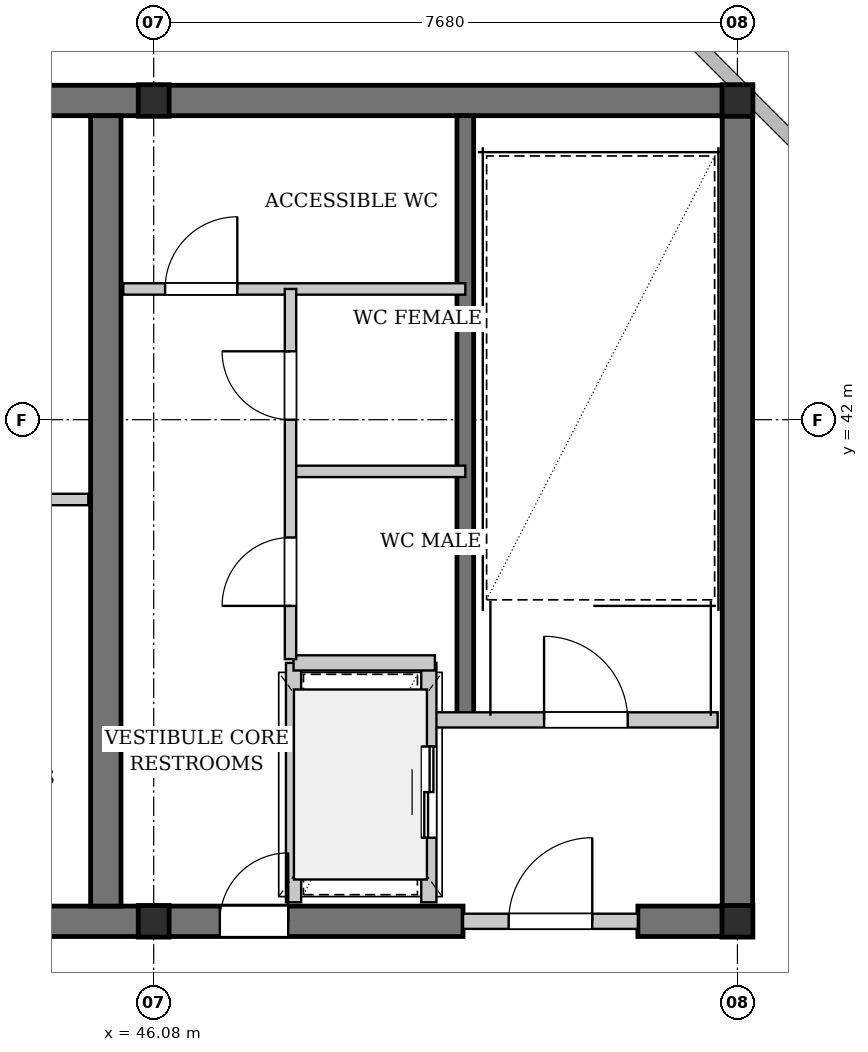
"""IFC4 building model, lengths in metres.
Left out: names, types, materials, properties, quantities, classifications, styles, units other than length and angle.
Written with IfcOpenShell. Run it as: python <this file> out.ifc"""

import sys

from ifc_helpers import new_model, si_unit, direction, frame, frame_2d, origin, origin_2d, place, context, subcontext, project, spatial, rectangle, i_section, extrude, element, fill, save


model = new_model("IFC4")
c1 = context("Model", 3, precision=1e-05, world=origin(), true_north=direction((0.0, 1.0)))
c2 = subcontext(c1, "Body", "Model", "MODEL_VIEW")
j1 = project(units=[si_unit("LENGTHUNIT", "METRE"), si_unit("PLANEANGLEUNIT", "RADIAN")], contexts=[c1])
p1 = place(None, origin())
s1 = spatial("IfcSite", under=j1, at=p1, CompositionType="ELEMENT")
p2 = place(p1, origin())
s2 = spatial("IfcBuilding", under=s1, at=p2, CompositionType="ELEMENT")
p3 = place(p2, frame((0.0, 0.0, 304.4)))
s3 = spatial("IfcBuildingStorey", under=s2, at=p3, CompositionType="ELEMENT", Elevation=304.4)
p4 = place(p3, frame((22.84, 46.2, 0.0), z_axis=(0.0, 0.0, 1.0), x_axis=(1.0, 0.0, 0.0)))
e1 = element("IfcWall", 1, at=p4, inside=s3, PredefinedType="SHEAR", context=c2, shape_type="SweptSolid", body=[
    extrude(rectangle(XDim=31.12, YDim=0.4, at=frame_2d((15.56, 0.0))), origin(), (0.0, 0.0, 1.0), 5.28),
])
p5 = place(p3, frame((42.1, 35.4, 0.0), z_axis=(0.0, 0.0, 1.0), x_axis=(1.0, 0.0, 0.0)))
e2 = element("IfcWall", 2, at=p5, inside=s3, PredefinedType="SHEAR", context=c2, shape_type="SweptSolid", body=[
    extrude(rectangle(XDim=8.05, YDim=0.4, at=frame_2d((4.025, 0.0))), origin(), (0.0, 0.0, 1.0), 5.28),
])
p6 = place(p5, frame((4.85, 0.0, 0.0)))
e3 = element("IfcOpeningElement", 3, at=p6, cuts=e2, PredefinedType="OPENING", context=c2, shape_type="SweptSolid", body=[
    extrude(rectangle(XDim=0.9, YDim=2.15, at=frame_2d((0.45, 1.075))), frame((0.0, 0.21, 0.0), z_axis=(0.0, -1.0, 0.0), x_axis=(1.0, 0.0, 0.0)), (0.0, 0.0, 1.0), 0.42),
])
p7 = place(p3, frame((52.45, 35.4, 0.0), z_axis=(0.0, 0.0, 1.0), x_axis=(1.0, 0.0, 0.0)))
e4 = element("IfcWall", 4, at=p7, inside=s3, PredefinedType="SHEAR", context=c2, shape_type="SweptSolid", body=[
    extrude(rectangle(XDim=1.51, YDim=0.4, at=frame_2d((0.755, 0.0))), origin(), (0.0, 0.0, 1.0), 5.28),
])
for number, where, z_axis, x_axis in (
    (5, (45.45, 35.6, 0.0), (0.0, 0.0, 1.0), (0.0, 1.0, 0.0)),
    (6, (53.76, 35.6, 0.0), (0.0, 0.0, 1.0), (0.0, 1.0, 0.0)),
):
    element("IfcWall", number, at=place(p3, frame(where, z_axis=z_axis, x_axis=x_axis)), inside=s3, PredefinedType="SHEAR", context=c2, shape_type="SweptSolid", body=[
        extrude(rectangle(XDim=10.4, YDim=0.4, at=frame_2d((5.2, 0.0))), origin(), (0.0, 0.0, 1.0), 5.28),
    ])
p8 = place(p3, frame((50.18, 38.05, 0.0), z_axis=(0.0, 0.0, 1.0), x_axis=(0.0, 1.0, 0.0)))
e7 = element("IfcWall", 7, at=p8, inside=s3, PredefinedType="SHEAR", context=c2, shape_type="SweptSolid", body=[
    extrude(rectangle(XDim=7.95, YDim=0.22, at=frame_2d((3.975, 0.0))), origin(), (0.0, 0.0, 1.0), 5.28),
])
for number, where, z_axis, x_axis in (
    (8, (46.08, 35.4, 0.0), (0.0, 0.0, 1.0), (1.0, 0.0, 0.0)),
    (9, (46.08, 46.2, 0.0), (0.0, 0.0, 1.0), (1.0, 0.0, 0.0)),
    (10, (53.76, 35.4, 0.0), (0.0, 0.0, 1.0), (1.0, 0.0, 0.0)),
    (11, (53.76, 46.2, 0.0), (0.0, 0.0, 1.0), (1.0, 0.0, 0.0)),
):
    element("IfcColumn", number, at=place(p3, frame(where, z_axis=z_axis, x_axis=x_axis)), inside=s3, PredefinedType="COLUMN", context=c2, shape_type="SweptSolid", body=[
        extrude(i_section(OverallWidth=0.406, OverallDepth=0.416, WebThickness=0.03, FlangeThickness=0.048, FilletRadius=0.015, at=origin_2d()), origin(), (0.0, 0.0, 1.0), 5.6),
    ])
p9 = place(p3, frame((41.85, 40.95, 0.0), z_axis=(0.0, 0.0, 1.0), x_axis=(1.0, 0.0, 0.0)))
e12 = element("IfcWall", 12, at=p9, inside=s3, PredefinedType="PARTITIONING", context=c2, shape_type="SweptSolid", body=[
    extrude(rectangle(XDim=3.37, YDim=0.15, at=frame_2d((1.685, 0.0))), origin(), (0.0, 0.0, 1.0), 5.28),
])
p10 = place(p3, frame((49.78, 38.05, 0.0), z_axis=(0.0, 0.0, 1.0), x_axis=(1.0, 0.0, 0.0)))
e13 = element("IfcWall", 13, at=p10, inside=s3, PredefinedType="PARTITIONING", context=c2, shape_type="SweptSolid", body=[
    extrude(rectangle(XDim=3.72, YDim=0.2, at=frame_2d((1.86, 0.0))), origin(), (0.0, 0.0, 1.0), 5.28),
])
p11 = place(p10, frame((1.436, 0.0, 0.0)))
e14 = element("IfcOpeningElement", 14, at=p11, cuts=e13, PredefinedType="OPENING", context=c2, shape_type="SweptSolid", body=[
    extrude(rectangle(XDim=1.1, YDim=2.15, at=frame_2d((0.55, 1.075))), frame((0.0, 0.11, 0.0), z_axis=(0.0, -1.0, 0.0), x_axis=(1.0, 0.0, 0.0)), (0.0, 0.0, 1.0), 0.22),
])
p12 = place(p3, frame((50.15, 35.4, 0.0), z_axis=(0.0, 0.0, 1.0), x_axis=(1.0, 0.0, 0.0)))
e15 = element("IfcWall", 15, at=p12, inside=s3, PredefinedType="PARTITIONING", context=c2, shape_type="SweptSolid", body=[
    extrude(rectangle(XDim=2.3, YDim=0.2, at=frame_2d((1.15, 0.0))), origin(), (0.0, 0.0, 1.0), 4.725),
])
p13 = place(p12, frame((0.6, 0.0, 0.0)))
e16 = element("IfcOpeningElement", 16, at=p13, cuts=e15, PredefinedType="OPENING", context=c2, shape_type="SweptSolid", body=[
    extrude(rectangle(XDim=1.1, YDim=2.15, at=frame_2d((0.55, 1.075))), frame((0.0, 0.11, 0.0), z_axis=(0.0, -1.0, 0.0), x_axis=(1.0, 0.0, 0.0)), (0.0, 0.0, 1.0), 0.22),
])
p14 = place(p3, frame((49.7, 35.65, 0.0), z_axis=(0.0, 0.0, 1.0), x_axis=(0.0, 1.0, 0.0)))
e17 = element("IfcWall", 17, at=p14, inside=s3, PredefinedType="PARTITIONING", context=c2, shape_type="SweptSolid", body=[
    extrude(rectangle(XDim=3.15, YDim=0.2, at=frame_2d((1.575, 0.0))), origin(), (0.0, 0.0, 1.0), 5.28),
])
p15 = place(p14, frame((0.85, 0.0, 0.0)))
e18 = element("IfcOpeningElement", 18, at=p15, cuts=e17, PredefinedType="OPENING", context=c2, shape_type="SweptSolid", body=[
    extrude(rectangle(XDim=1.2, YDim=2.2, at=frame_2d((0.6, 1.1))), frame((0.0, 0.11, 0.0), z_axis=(0.0, -1.0, 0.0), x_axis=(1.0, 0.0, 0.0)), (0.0, 0.0, 1.0), 0.22),
])
p16 = place(p3, frame((47.92, 35.65, 0.0), z_axis=(0.0, 0.0, 1.0), x_axis=(0.0, 1.0, 0.0)))
e19 = element("IfcWall", 19, at=p16, inside=s3, PredefinedType="PARTITIONING", context=c2, shape_type="SweptSolid", body=[
    extrude(rectangle(XDim=3.15, YDim=0.2, at=frame_2d((1.575, 0.0))), origin(), (0.0, 0.0, 1.0), 5.28),
])
p17 = place(p3, frame((47.92, 38.8, 0.0), z_axis=(0.0, 0.0, 1.0), x_axis=(1.0, 0.0, 0.0)))
e20 = element("IfcWall", 20, at=p17, inside=s3, PredefinedType="PARTITIONING", context=c2, shape_type="SweptSolid", body=[
    extrude(rectangle(XDim=1.86, YDim=0.2, at=frame_2d((0.93, 0.0))), origin(), (0.0, 0.0, 1.0), 5.28),
])
p18 = place(p3, frame((45.68, 43.72, 0.0), z_axis=(0.0, 0.0, 1.0), x_axis=(1.0, 0.0, 0.0)))
e21 = element("IfcWall", 21, at=p18, inside=s3, PredefinedType="PARTITIONING", context=c2, shape_type="SweptSolid", body=[
    extrude(rectangle(XDim=4.5, YDim=0.15, at=frame_2d((2.25, 0.0))), origin(), (0.0, 0.0, 1.0), 5.28),
])
p19 = place(p18, frame((0.55, 0.0, 0.0)))
e22 = element("IfcOpeningElement", 22, at=p19, cuts=e21, PredefinedType="OPENING", context=c2, shape_type="SweptSolid", body=[
    extrude(rectangle(XDim=0.95, YDim=2.15, at=frame_2d((0.475, 1.075))), frame((0.0, 0.085, 0.0), z_axis=(0.0, -1.0, 0.0), x_axis=(1.0, 0.0, 0.0)), (0.0, 0.0, 1.0), 0.17),
])
p20 = place(p3, frame((47.88, 41.32, 0.0), z_axis=(0.0, 0.0, 1.0), x_axis=(1.0, 0.0, 0.0)))
e23 = element("IfcWall", 23, at=p20, inside=s3, PredefinedType="PARTITIONING", context=c2, shape_type="SweptSolid", body=[
    extrude(rectangle(XDim=2.3, YDim=0.15, at=frame_2d((1.15, 0.0))), origin(), (0.0, 0.0, 1.0), 5.28),
])
p21 = place(p3, frame((47.88, 38.85, 0.0), z_axis=(0.0, 0.0, 1.0), x_axis=(0.0, 1.0, 0.0)))
e24 = element("IfcWall", 24, at=p21, inside=s3, PredefinedType="PARTITIONING", context=c2, shape_type="SweptSolid", body=[
    extrude(rectangle(XDim=4.87, YDim=0.15, at=frame_2d((2.435, 0.0))), origin(), (0.0, 0.0, 1.0), 5.28),
])
p22 = place(p21, frame((0.7, 0.0, 0.0)))
e25 = element("IfcOpeningElement", 25, at=p22, cuts=e24, PredefinedType="OPENING", context=c2, shape_type="SweptSolid", body=[
    extrude(rectangle(XDim=0.9, YDim=2.15, at=frame_2d((0.45, 1.075))), frame((0.0, 0.085, 0.0), z_axis=(0.0, -1.0, 0.0), x_axis=(1.0, 0.0, 0.0)), (0.0, 0.0, 1.0), 0.17),
])
p23 = place(p21, frame((3.15, 0.0, 0.0)))
e26 = element("IfcOpeningElement", 26, at=p23, cuts=e24, PredefinedType="OPENING", context=c2, shape_type="SweptSolid", body=[
    extrude(rectangle(XDim=0.9, YDim=2.15, at=frame_2d((0.45, 1.075))), frame((0.0, 0.085, 0.0), z_axis=(0.0, -1.0, 0.0), x_axis=(1.0, 0.0, 0.0)), (0.0, 0.0, 1.0), 0.17),
])
p24 = place(p11, origin())
e27 = element("IfcDoor", 27, at=p24, inside=s3, OperationType="SINGLE_SWING_LEFT", PredefinedType="DOOR", context=c2, shape_type="SweptSolid", body=[
    extrude(rectangle(XDim=1.1, YDim=2.15, at=frame_2d((0.55, 1.075))), frame((0.0, 0.025, 0.0), z_axis=(0.0, -1.0, 0.0), x_axis=(1.0, 0.0, 0.0)), (0.0, 0.0, 1.0), 0.05),
])
fill(e14, e27)
p25 = place(p13, origin())
e28 = element("IfcDoor", 28, at=p25, inside=s3, OperationType="SINGLE_SWING_RIGHT", PredefinedType="DOOR", context=c2, shape_type="SweptSolid", body=[
    extrude(rectangle(XDim=1.1, YDim=2.15, at=frame_2d((0.55, 1.075))), frame((0.0, 0.025, 0.0), z_axis=(0.0, -1.0, 0.0), x_axis=(1.0, 0.0, 0.0)), (0.0, 0.0, 1.0), 0.05),
])
fill(e16, e28)
p26 = place(p15, origin())
e29 = element("IfcDoor", 29, at=p26, inside=s3, OperationType="DOUBLE_DOOR_SLIDING", PredefinedType="DOOR", context=c2, shape_type="SweptSolid", body=[
    extrude(rectangle(XDim=1.2, YDim=2.2, at=frame_2d((0.6, 1.1))), frame((0.0, 0.025, 0.0), z_axis=(0.0, -1.0, 0.0), x_axis=(1.0, 0.0, 0.0)), (0.0, 0.0, 1.0), 0.05),
])
fill(e18, e29)
p27 = place(p19, origin())
e30 = element("IfcDoor", 30, at=p27, inside=s3, OperationType="SINGLE_SWING_RIGHT", PredefinedType="DOOR", context=c2, shape_type="SweptSolid", body=[
    extrude(rectangle(XDim=0.95, YDim=2.15, at=frame_2d((0.475, 1.075))), frame((0.0, 0.025, 0.0), z_axis=(0.0, -1.0, 0.0), x_axis=(1.0, 0.0, 0.0)), (0.0, 0.0, 1.0), 0.05),
])
fill(e22, e30)
p28 = place(p22, origin())
e31 = element("IfcDoor", 31, at=p28, inside=s3, OperationType="SINGLE_SWING_LEFT", PredefinedType="DOOR", context=c2, shape_type="SweptSolid", body=[
    extrude(rectangle(XDim=0.9, YDim=2.15, at=frame_2d((0.45, 1.075))), frame((0.0, 0.025, 0.0), z_axis=(0.0, -1.0, 0.0), x_axis=(1.0, 0.0, 0.0)), (0.0, 0.0, 1.0), 0.05),
])
fill(e25, e31)
p29 = place(p23, origin())
e32 = element("IfcDoor", 32, at=p29, inside=s3, OperationType="SINGLE_SWING_RIGHT", PredefinedType="DOOR", context=c2, shape_type="SweptSolid", body=[
    extrude(rectangle(XDim=0.9, YDim=2.15, at=frame_2d((0.45, 1.075))), frame((0.0, 0.025, 0.0), z_axis=(0.0, -1.0, 0.0), x_axis=(1.0, 0.0, 0.0)), (0.0, 0.0, 1.0), 0.05),
])
fill(e26, e32)
p30 = place(p6, origin())
e33 = element("IfcDoor", 33, at=p30, inside=s3, OperationType="SINGLE_SWING_RIGHT", PredefinedType="DOOR", context=c2, shape_type="SweptSolid", body=[
    extrude(rectangle(XDim=0.9, YDim=2.15, at=frame_2d((0.45, 1.075))), frame((0.0, 0.025, 0.0), z_axis=(0.0, -1.0, 0.0), x_axis=(1.0, 0.0, 0.0)), (0.0, 0.0, 1.0), 0.05),
])
fill(e3, e33)
save(model, sys.argv[1])
